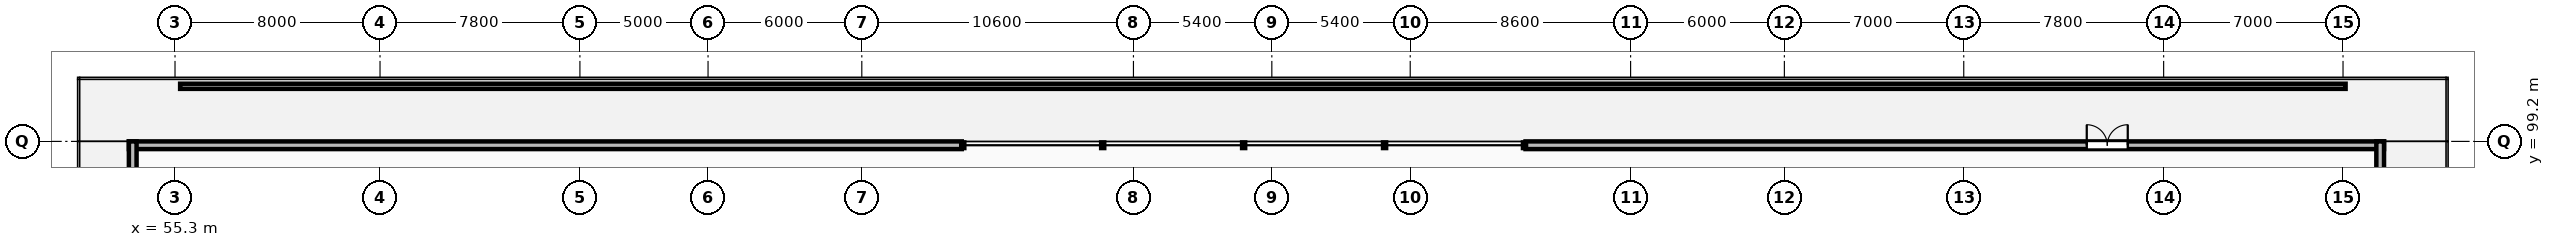
"""IFC4 building model, lengths in metres.
Left out: names, types, materials, properties, quantities, classifications, styles, units other than length and angle.
Written with IfcOpenShell. Run it as: python <this file> out.ifc"""

import sys

from ifc_helpers import new_model, si_unit, direction, frame, frame_2d, origin, place, context, subcontext, project, spatial, rectangle, extrude, element, fill, save


model = new_model("IFC4")
c1 = context("Model", 3, precision=1e-05, world=origin(), true_north=direction((0.0, 1.0)))
c2 = subcontext(c1, "Body", "Model", "MODEL_VIEW")
j1 = project(units=[si_unit("LENGTHUNIT", "METRE"), si_unit("PLANEANGLEUNIT", "RADIAN")], contexts=[c1])
p1 = place(None, origin())
s1 = spatial("IfcSite", under=j1, at=p1, CompositionType="ELEMENT")
p2 = place(p1, origin())
s2 = spatial("IfcBuilding", under=s1, at=p2, CompositionType="ELEMENT")
p3 = place(p2, frame((0.0, 0.0, 19.0)))
s3 = spatial("IfcBuildingStorey", under=s2, at=p3, CompositionType="ELEMENT", Elevation=19.0)
p4 = place(p3, frame((141.5, 99.05, 0.0), z_axis=(0.0, 0.0, 1.0), x_axis=(-1.0, 0.0, 0.0)))
e1 = element("IfcWall", 1, at=p4, inside=s3, PredefinedType="STANDARD", context=c2, shape_type="SweptSolid", body=[
    extrude(rectangle(XDim=33.5, YDim=0.3, at=frame_2d((16.75, 0.0))), origin(), (0.0, 0.0, 1.0), 4.68),
])
p5 = place(p4, frame((10.0, 0.0, 0.0)))
e2 = element("IfcOpeningElement", 2, at=p5, cuts=e1, PredefinedType="OPENING", context=c2, shape_type="SweptSolid", body=[
    extrude(rectangle(XDim=1.6, YDim=2.2, at=frame_2d((0.8, 1.1))), frame((0.0, 0.16, 0.0), z_axis=(0.0, -1.0, 0.0), x_axis=(1.0, 0.0, 0.0)), (0.0, 0.0, 1.0), 0.32),
])
p6 = place(p3, frame((86.0, 99.05, 0.0), z_axis=(0.0, 0.0, 1.0), x_axis=(-1.0, 0.0, 0.0)))
e3 = element("IfcWall", 3, at=p6, inside=s3, PredefinedType="STANDARD", context=c2, shape_type="SweptSolid", body=[
    extrude(rectangle(XDim=32.5, YDim=0.3, at=frame_2d((16.25, 0.0))), origin(), (0.0, 0.0, 1.0), 4.68),
])
p7 = place(p3, frame((53.65, 99.2, 0.0), z_axis=(0.0, 0.0, 1.0), x_axis=(0.0, -1.0, 0.0)))
e4 = element("IfcWall", 4, at=p7, inside=s3, PredefinedType="STANDARD", context=c2, shape_type="SweptSolid", body=[
    extrude(rectangle(XDim=115.0, YDim=0.3, at=frame_2d((57.5, 0.0))), origin(), (0.0, 0.0, 1.0), 4.68),
])
p8 = place(p7, frame((12.0, 0.0, 0.0)))
e5 = element("IfcOpeningElement", 5, at=p8, cuts=e4, PredefinedType="OPENING", context=c2, shape_type="SweptSolid", body=[
    extrude(rectangle(XDim=1.6, YDim=2.2, at=frame_2d((0.8, 1.1))), frame((0.0, 0.16, 0.0), z_axis=(0.0, -1.0, 0.0), x_axis=(1.0, 0.0, 0.0)), (0.0, 0.0, 1.0), 0.32),
])
p9 = place(p3, frame((141.35, -15.8, 0.0), z_axis=(0.0, 0.0, 1.0), x_axis=(0.0, 1.0, 0.0)))
e6 = element("IfcWall", 6, at=p9, inside=s3, PredefinedType="STANDARD", context=c2, shape_type="SweptSolid", body=[
    extrude(rectangle(XDim=115.0, YDim=0.3, at=frame_2d((57.5, 0.0))), origin(), (0.0, 0.0, 1.0), 4.68),
])
p10 = place(p9, frame((20.0, 0.0, 0.0)))
e7 = element("IfcOpeningElement", 7, at=p10, cuts=e6, PredefinedType="OPENING", context=c2, shape_type="SweptSolid", body=[
    extrude(rectangle(XDim=1.6, YDim=2.2, at=frame_2d((0.8, 1.1))), frame((0.0, 0.16, 0.0), z_axis=(0.0, -1.0, 0.0), x_axis=(1.0, 0.0, 0.0)), (0.0, 0.0, 1.0), 0.32),
])
p11 = place(p3, frame((140.0, 101.35, 0.0), z_axis=(0.0, 0.0, 1.0), x_axis=(-1.0, 0.0, 0.0)))
e8 = element("IfcWall", 8, at=p11, inside=s3, PredefinedType="PARAPET", context=c2, shape_type="SweptSolid", body=[
    extrude(rectangle(XDim=84.5, YDim=0.2, at=frame_2d((42.25, 0.0))), origin(), (0.0, 0.0, 1.0), 0.65),
])
p12 = place(p5, frame((1.6, 0.0, 0.0), z_axis=(0.0, 0.0, 1.0), x_axis=(-1.0, 0.0, 0.0)))
e9 = element("IfcDoor", 9, at=p12, inside=s3, OperationType="DOUBLE_DOOR_SINGLE_SWING", PredefinedType="DOOR", context=c2, shape_type="SweptSolid", body=[
    extrude(rectangle(XDim=1.6, YDim=2.2, at=frame_2d((0.8, 1.1))), frame((0.0, 0.025, 0.0), z_axis=(0.0, -1.0, 0.0), x_axis=(1.0, 0.0, 0.0)), (0.0, 0.0, 1.0), 0.05),
])
fill(e2, e9)
save(model, sys.argv[1])
